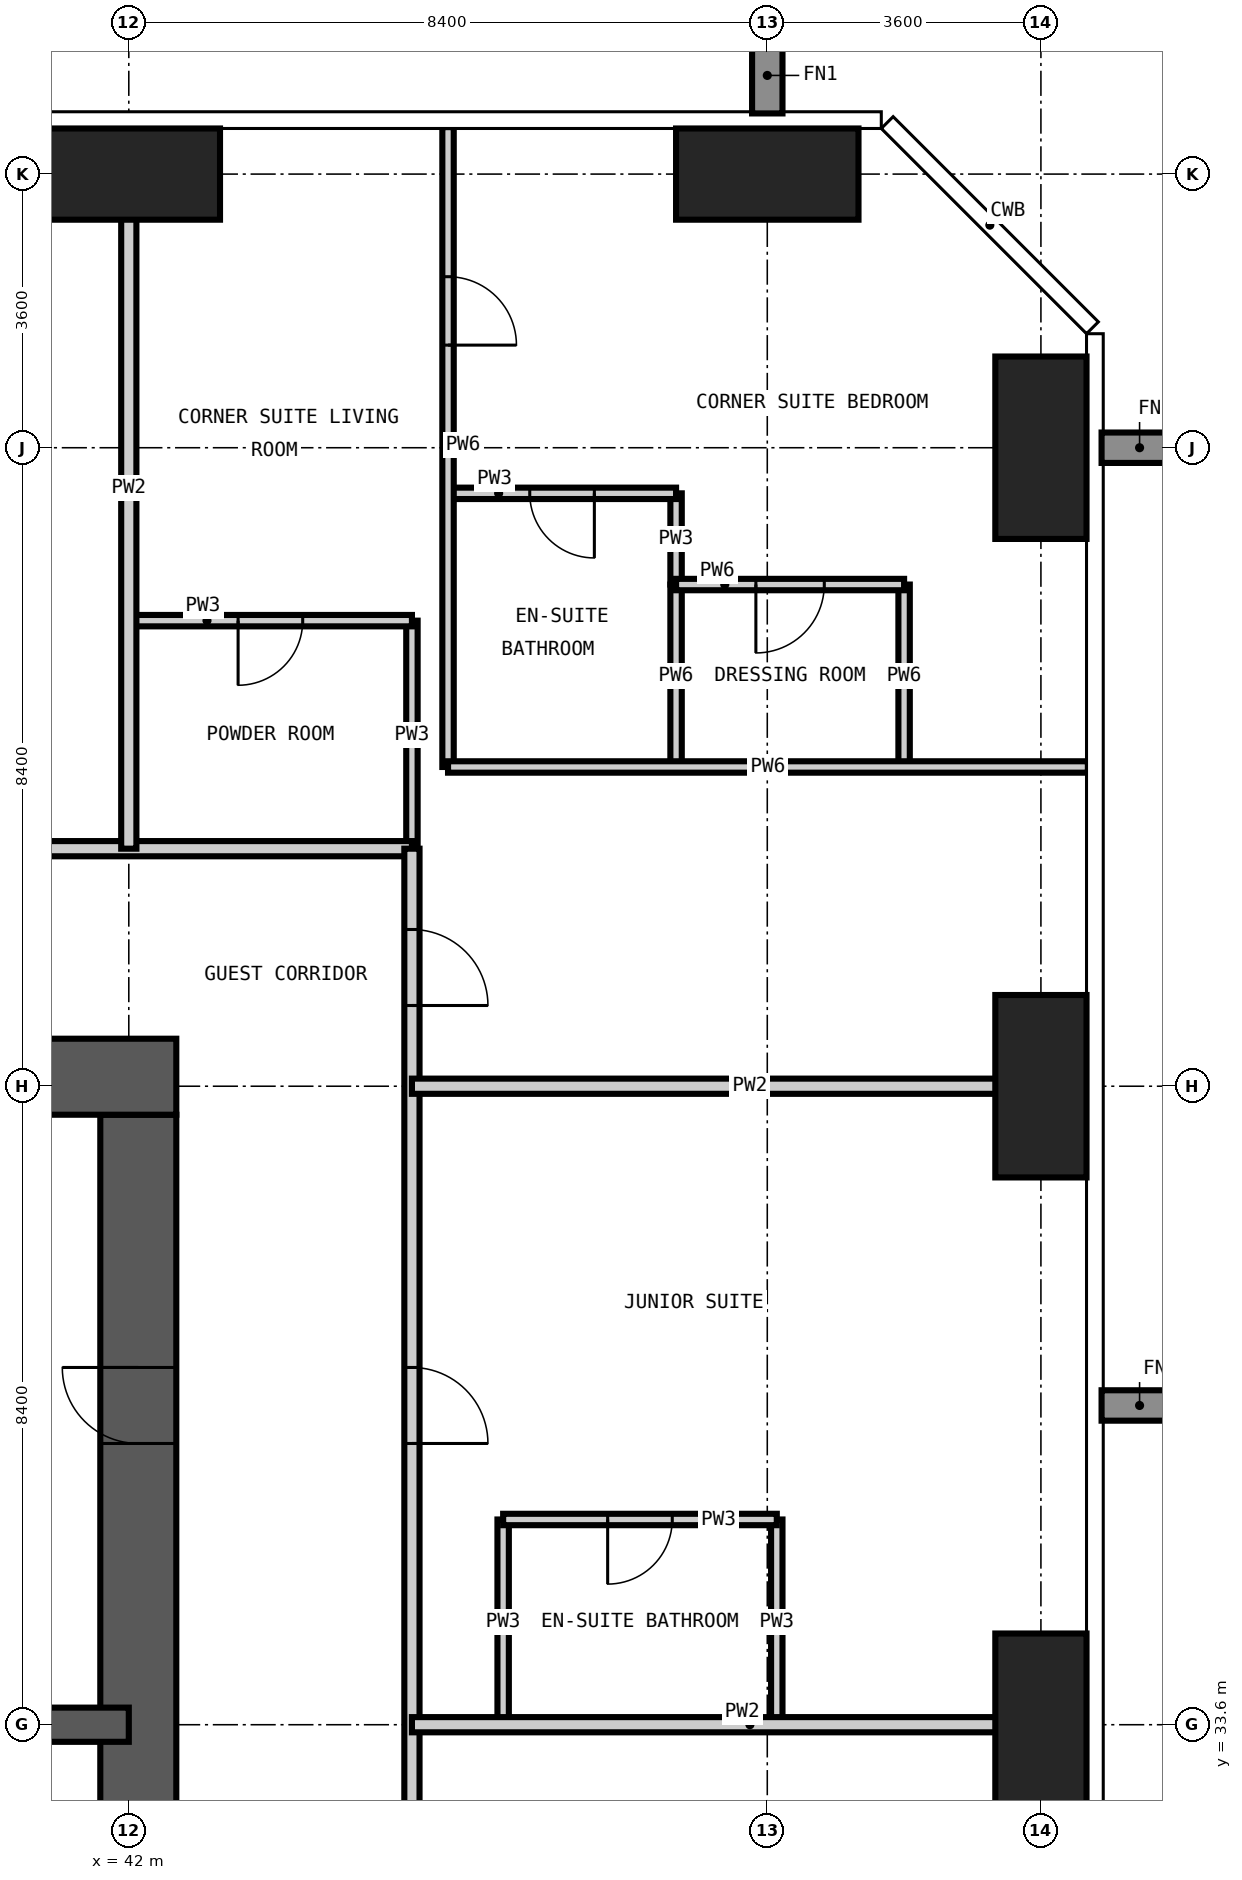
"""IFC4 building model, lengths in metres.
Left out: names, types, materials, properties, quantities, classifications, styles, units other than length and angle.
Written with IfcOpenShell. Run it as: python <this file> out.ifc"""

import sys

from ifc_helpers import new_model, si_unit, direction, frame, frame_2d, origin, origin_2d, place, context, subcontext, project, spatial, rectangle, extrude, element, fill, save


model = new_model("IFC4")
c1 = context("Model", 3, precision=1e-05, world=origin(), true_north=direction((0.0, 1.0)))
c2 = subcontext(c1, "Body", "Model", "MODEL_VIEW")
j1 = project(units=[si_unit("LENGTHUNIT", "METRE"), si_unit("PLANEANGLEUNIT", "RADIAN")], contexts=[c1])
p1 = place(None, origin())
s1 = spatial("IfcSite", under=j1, at=p1, CompositionType="ELEMENT")
p2 = place(p1, origin())
s2 = spatial("IfcBuilding", under=s1, at=p2, CompositionType="ELEMENT")
p3 = place(p2, frame((0.0, 0.0, 133.2)))
s3 = spatial("IfcBuildingStorey", under=s2, at=p3, CompositionType="ELEMENT", Elevation=133.2)
for number, where, z_axis, x_axis in (
    (1, (42.0, 54.0, -0.35), (0.0, 0.0, 1.0), (1.0, 0.0, 0.0)),
    (2, (50.4, 54.0, -0.35), (0.0, 0.0, 1.0), (1.0, 0.0, 0.0)),
):
    element("IfcColumn", number, at=place(p3, frame(where, z_axis=z_axis, x_axis=x_axis)), inside=s3, PredefinedType="COLUMN", context=c2, shape_type="SweptSolid", body=[
        extrude(rectangle(XDim=2.4, YDim=1.2, at=origin_2d()), origin(), (0.0, 0.0, 1.0), 3.6),
    ])
for number, where, z_axis, x_axis in (
    (3, (54.0, 33.6, -0.35), (0.0, 0.0, 1.0), (1.0, 0.0, 0.0)),
    (4, (54.0, 42.0, -0.35), (0.0, 0.0, 1.0), (1.0, 0.0, 0.0)),
    (5, (54.0, 50.4, -0.35), (0.0, 0.0, 1.0), (1.0, 0.0, 0.0)),
):
    element("IfcColumn", number, at=place(p3, frame(where, z_axis=z_axis, x_axis=x_axis)), inside=s3, PredefinedType="COLUMN", context=c2, shape_type="SweptSolid", body=[
        extrude(rectangle(XDim=1.2, YDim=2.4, at=origin_2d()), origin(), (0.0, 0.0, 1.0), 3.6),
    ])
p4 = place(p3, frame((42.125, 17.175, -0.35), z_axis=(0.0, 0.0, 1.0), x_axis=(0.0, 1.0, 0.0)))
e6 = element("IfcWall", 6, at=p4, inside=s3, PredefinedType="SHEAR", context=c2, shape_type="SweptSolid", body=[
    extrude(rectangle(XDim=24.45, YDim=1.0, at=frame_2d((12.225, 0.0))), origin(), (0.0, 0.0, 1.0), 3.6),
])
p5 = place(p4, frame((0.425, 0.0, 0.35)))
e7 = element("IfcOpeningElement", 7, at=p5, cuts=e6, PredefinedType="OPENING", context=c2, shape_type="SweptSolid", body=[
    extrude(rectangle(XDim=1.2, YDim=2.2, at=frame_2d((0.6, 1.1))), frame((0.0, 0.51, 0.0), z_axis=(0.0, -1.0, 0.0), x_axis=(1.0, 0.0, 0.0)), (0.0, 0.0, 1.0), 1.02),
])
p6 = place(p4, frame((11.325, 0.0, 0.35)))
e8 = element("IfcOpeningElement", 8, at=p6, cuts=e6, PredefinedType="OPENING", context=c2, shape_type="SweptSolid", body=[
    extrude(rectangle(XDim=1.8, YDim=2.2, at=frame_2d((0.9, 1.1))), frame((0.0, 0.51, 0.0), z_axis=(0.0, -1.0, 0.0), x_axis=(1.0, 0.0, 0.0)), (0.0, 0.0, 1.0), 1.02),
])
p7 = place(p4, frame((20.125, 0.0, 0.35)))
e9 = element("IfcOpeningElement", 9, at=p7, cuts=e6, PredefinedType="OPENING", context=c2, shape_type="SweptSolid", body=[
    extrude(rectangle(XDim=1.0, YDim=2.1, at=frame_2d((0.5, 1.05))), frame((0.0, 0.51, 0.0), z_axis=(0.0, -1.0, 0.0), x_axis=(1.0, 0.0, 0.0)), (0.0, 0.0, 1.0), 1.02),
])
p8 = place(p3, frame((42.625, 42.125, -0.35), z_axis=(0.0, 0.0, 1.0), x_axis=(-1.0, 0.0, 0.0)))
e10 = element("IfcWall", 10, at=p8, inside=s3, PredefinedType="SHEAR", context=c2, shape_type="SweptSolid", body=[
    extrude(rectangle(XDim=26.45, YDim=1.0, at=frame_2d((13.225, 0.0))), origin(), (0.0, 0.0, 1.0), 3.6),
])
p9 = place(p8, frame((21.125, 0.0, 0.35)))
e11 = element("IfcOpeningElement", 11, at=p9, cuts=e10, PredefinedType="OPENING", context=c2, shape_type="SweptSolid", body=[
    extrude(rectangle(XDim=1.0, YDim=2.1, at=frame_2d((0.5, 1.05))), frame((0.0, 0.51, 0.0), z_axis=(0.0, -1.0, 0.0), x_axis=(1.0, 0.0, 0.0)), (0.0, 0.0, 1.0), 1.02),
])
p10 = place(p8, frame((10.525, 0.0, 0.35)))
e12 = element("IfcOpeningElement", 12, at=p10, cuts=e10, PredefinedType="OPENING", context=c2, shape_type="SweptSolid", body=[
    extrude(rectangle(XDim=1.2, YDim=2.2, at=frame_2d((0.6, 1.1))), frame((0.0, 0.51, 0.0), z_axis=(0.0, -1.0, 0.0), x_axis=(1.0, 0.0, 0.0)), (0.0, 0.0, 1.0), 1.02),
])
p11 = place(p3, frame((16.8, 33.6, -0.35), z_axis=(0.0, 0.0, 1.0), x_axis=(1.0, 0.0, 0.0)))
e13 = element("IfcWall", 13, at=p11, inside=s3, PredefinedType="SHEAR", context=c2, shape_type="SweptSolid", body=[
    extrude(rectangle(XDim=25.2, YDim=0.45, at=frame_2d((12.6, 0.0))), origin(), (0.0, 0.0, 1.0), 3.6),
])
p12 = place(p11, frame((22.6, 0.0, 0.35)))
e14 = element("IfcOpeningElement", 14, at=p12, cuts=e13, PredefinedType="OPENING", context=c2, shape_type="SweptSolid", body=[
    extrude(rectangle(XDim=1.0, YDim=2.1, at=frame_2d((0.5, 1.05))), frame((0.0, 0.235, 0.0), z_axis=(0.0, -1.0, 0.0), x_axis=(1.0, 0.0, 0.0)), (0.0, 0.0, 1.0), 0.47),
])
p13 = place(p3, frame((45.725, 45.125, 0.0), z_axis=(0.0, 0.0, 1.0), x_axis=(0.0, 1.0, 0.0)))
e15 = element("IfcWall", 15, at=p13, inside=s3, PredefinedType="PARTITIONING", context=c2, shape_type="SweptSolid", body=[
    extrude(rectangle(XDim=3.0, YDim=0.15, at=frame_2d((1.5, 0.0))), origin(), (0.0, 0.0, 1.0), 3.25),
])
p14 = place(p3, frame((46.925, 33.6, 0.0), z_axis=(0.0, 0.0, 1.0), x_axis=(0.0, 1.0, 0.0)))
e16 = element("IfcWall", 16, at=p14, inside=s3, PredefinedType="PARTITIONING", context=c2, shape_type="SweptSolid", body=[
    extrude(rectangle(XDim=2.7, YDim=0.15, at=frame_2d((1.35, 0.0))), origin(), (0.0, 0.0, 1.0), 3.25),
])
p15 = place(p3, frame((49.2, 48.6, 0.0), z_axis=(0.0, 0.0, 1.0), x_axis=(0.0, 1.0, 0.0)))
e17 = element("IfcWall", 17, at=p15, inside=s3, PredefinedType="PARTITIONING", context=c2, shape_type="SweptSolid", body=[
    extrude(rectangle(XDim=1.2, YDim=0.15, at=frame_2d((0.6, 0.0))), origin(), (0.0, 0.0, 1.0), 3.25),
])
p16 = place(p3, frame((50.525, 33.6, 0.0), z_axis=(0.0, 0.0, 1.0), x_axis=(0.0, 1.0, 0.0)))
e18 = element("IfcWall", 18, at=p16, inside=s3, PredefinedType="PARTITIONING", context=c2, shape_type="SweptSolid", body=[
    extrude(rectangle(XDim=2.7, YDim=0.15, at=frame_2d((1.35, 0.0))), origin(), (0.0, 0.0, 1.0), 3.25),
])
p17 = place(p3, frame((46.925, 36.3, 0.0), z_axis=(0.0, 0.0, 1.0), x_axis=(1.0, 0.0, 0.0)))
e19 = element("IfcWall", 19, at=p17, inside=s3, PredefinedType="PARTITIONING", context=c2, shape_type="SweptSolid", body=[
    extrude(rectangle(XDim=3.6, YDim=0.15, at=frame_2d((1.8, 0.0))), origin(), (0.0, 0.0, 1.0), 3.25),
])
p18 = place(p17, frame((1.375, 0.0, 0.0)))
e20 = element("IfcOpeningElement", 20, at=p18, cuts=e19, PredefinedType="OPENING", context=c2, shape_type="SweptSolid", body=[
    extrude(rectangle(XDim=0.85, YDim=2.1, at=frame_2d((0.425, 1.05))), frame((0.0, 0.085, 0.0), z_axis=(0.0, -1.0, 0.0), x_axis=(1.0, 0.0, 0.0)), (0.0, 0.0, 1.0), 0.17),
])
p19 = place(p3, frame((42.0, 48.125, 0.0), z_axis=(0.0, 0.0, 1.0), x_axis=(1.0, 0.0, 0.0)))
e21 = element("IfcWall", 21, at=p19, inside=s3, PredefinedType="PARTITIONING", context=c2, shape_type="SweptSolid", body=[
    extrude(rectangle(XDim=3.725, YDim=0.15, at=frame_2d((1.863, 0.0))), origin(), (0.0, 0.0, 1.0), 3.25),
])
p20 = place(p19, frame((1.438, 0.0, 0.0)))
e22 = element("IfcOpeningElement", 22, at=p20, cuts=e21, PredefinedType="OPENING", context=c2, shape_type="SweptSolid", body=[
    extrude(rectangle(XDim=0.85, YDim=2.1, at=frame_2d((0.425, 1.05))), frame((0.0, 0.085, 0.0), z_axis=(0.0, -1.0, 0.0), x_axis=(1.0, 0.0, 0.0)), (0.0, 0.0, 1.0), 0.17),
])
p21 = place(p3, frame((46.2, 49.8, 0.0), z_axis=(0.0, 0.0, 1.0), x_axis=(1.0, 0.0, 0.0)))
e23 = element("IfcWall", 23, at=p21, inside=s3, PredefinedType="PARTITIONING", context=c2, shape_type="SweptSolid", body=[
    extrude(rectangle(XDim=3.0, YDim=0.15, at=frame_2d((1.5, 0.0))), origin(), (0.0, 0.0, 1.0), 3.25),
])
p22 = place(p21, frame((1.075, 0.0, 0.0)))
e24 = element("IfcOpeningElement", 24, at=p22, cuts=e23, PredefinedType="OPENING", context=c2, shape_type="SweptSolid", body=[
    extrude(rectangle(XDim=0.85, YDim=2.1, at=frame_2d((0.425, 1.05))), frame((0.0, 0.085, 0.0), z_axis=(0.0, -1.0, 0.0), x_axis=(1.0, 0.0, 0.0)), (0.0, 0.0, 1.0), 0.17),
])
p23 = place(p3, frame((12.6, 45.125, 0.0), z_axis=(0.0, 0.0, 1.0), x_axis=(1.0, 0.0, 0.0)))
e25 = element("IfcWall", 25, at=p23, inside=s3, PredefinedType="PARTITIONING", context=c2, shape_type="SweptSolid", body=[
    extrude(rectangle(XDim=33.125, YDim=0.2, at=frame_2d((16.562, 0.0))), origin(), (0.0, 0.0, 1.0), 3.25),
])
p24 = place(p23, frame((5.8, 0.0, 0.0)))
e26 = element("IfcOpeningElement", 26, at=p24, cuts=e25, PredefinedType="OPENING", context=c2, shape_type="SweptSolid", body=[
    extrude(rectangle(XDim=1.0, YDim=2.2, at=frame_2d((0.5, 1.1))), frame((0.0, 0.11, 0.0), z_axis=(0.0, -1.0, 0.0), x_axis=(1.0, 0.0, 0.0)), (0.0, 0.0, 1.0), 0.22),
])
p25 = place(p23, frame((12.1, 0.0, 0.0)))
e27 = element("IfcOpeningElement", 27, at=p25, cuts=e25, PredefinedType="OPENING", context=c2, shape_type="SweptSolid", body=[
    extrude(rectangle(XDim=1.0, YDim=2.2, at=frame_2d((0.5, 1.1))), frame((0.0, 0.11, 0.0), z_axis=(0.0, -1.0, 0.0), x_axis=(1.0, 0.0, 0.0)), (0.0, 0.0, 1.0), 0.22),
])
p26 = place(p23, frame((20.5, 0.0, 0.0)))
e28 = element("IfcOpeningElement", 28, at=p26, cuts=e25, PredefinedType="OPENING", context=c2, shape_type="SweptSolid", body=[
    extrude(rectangle(XDim=1.0, YDim=2.2, at=frame_2d((0.5, 1.1))), frame((0.0, 0.11, 0.0), z_axis=(0.0, -1.0, 0.0), x_axis=(1.0, 0.0, 0.0)), (0.0, 0.0, 1.0), 0.22),
])
p27 = place(p23, frame((26.8, 0.0, 0.0)))
e29 = element("IfcOpeningElement", 29, at=p27, cuts=e25, PredefinedType="OPENING", context=c2, shape_type="SweptSolid", body=[
    extrude(rectangle(XDim=1.0, YDim=2.2, at=frame_2d((0.5, 1.1))), frame((0.0, 0.11, 0.0), z_axis=(0.0, -1.0, 0.0), x_axis=(1.0, 0.0, 0.0)), (0.0, 0.0, 1.0), 0.22),
])
p28 = place(p3, frame((45.725, 45.125, 0.0), z_axis=(0.0, 0.0, 1.0), x_axis=(0.0, -1.0, 0.0)))
e30 = element("IfcWall", 30, at=p28, inside=s3, PredefinedType="PARTITIONING", context=c2, shape_type="SweptSolid", body=[
    extrude(rectangle(XDim=30.85, YDim=0.2, at=frame_2d((15.425, 0.0))), origin(), (0.0, 0.0, 1.0), 3.25),
])
p29 = place(p28, frame((21.525, 0.0, 0.0)))
e31 = element("IfcOpeningElement", 31, at=p29, cuts=e30, PredefinedType="OPENING", context=c2, shape_type="SweptSolid", body=[
    extrude(rectangle(XDim=1.0, YDim=2.2, at=frame_2d((0.5, 1.1))), frame((0.0, 0.11, 0.0), z_axis=(0.0, -1.0, 0.0), x_axis=(1.0, 0.0, 0.0)), (0.0, 0.0, 1.0), 0.22),
])
p30 = place(p28, frame((13.125, 0.0, 0.0)))
e32 = element("IfcOpeningElement", 32, at=p30, cuts=e30, PredefinedType="OPENING", context=c2, shape_type="SweptSolid", body=[
    extrude(rectangle(XDim=1.0, YDim=2.2, at=frame_2d((0.5, 1.1))), frame((0.0, 0.11, 0.0), z_axis=(0.0, -1.0, 0.0), x_axis=(1.0, 0.0, 0.0)), (0.0, 0.0, 1.0), 0.22),
])
p31 = place(p28, frame((6.825, 0.0, 0.0)))
e33 = element("IfcOpeningElement", 33, at=p31, cuts=e30, PredefinedType="OPENING", context=c2, shape_type="SweptSolid", body=[
    extrude(rectangle(XDim=1.0, YDim=2.2, at=frame_2d((0.5, 1.1))), frame((0.0, 0.11, 0.0), z_axis=(0.0, -1.0, 0.0), x_axis=(1.0, 0.0, 0.0)), (0.0, 0.0, 1.0), 0.22),
])
p32 = place(p28, frame((29.087, 0.0, 0.0)))
e34 = element("IfcOpeningElement", 34, at=p32, cuts=e30, PredefinedType="OPENING", context=c2, shape_type="SweptSolid", body=[
    extrude(rectangle(XDim=1.0, YDim=2.2, at=frame_2d((0.5, 1.1))), frame((0.0, 0.11, 0.0), z_axis=(0.0, -1.0, 0.0), x_axis=(1.0, 0.0, 0.0)), (0.0, 0.0, 1.0), 0.22),
])
p33 = place(p28, frame((1.063, 0.0, 0.0)))
e35 = element("IfcOpeningElement", 35, at=p33, cuts=e30, PredefinedType="OPENING", context=c2, shape_type="SweptSolid", body=[
    extrude(rectangle(XDim=1.0, YDim=2.2, at=frame_2d((0.5, 1.1))), frame((0.0, 0.11, 0.0), z_axis=(0.0, -1.0, 0.0), x_axis=(1.0, 0.0, 0.0)), (0.0, 0.0, 1.0), 0.22),
])
p34 = place(p3, frame((42.0, 45.125, 0.0), z_axis=(0.0, 0.0, 1.0), x_axis=(0.0, 1.0, 0.0)))
e36 = element("IfcWall", 36, at=p34, inside=s3, PredefinedType="PARTITIONING", context=c2, shape_type="SweptSolid", body=[
    extrude(rectangle(XDim=9.493, YDim=0.2, at=frame_2d((4.747, 0.0))), origin(), (0.0, 0.0, 1.0), 3.25),
])
for number, where, z_axis, x_axis in (
    (37, (45.725, 33.6, 0.0), (0.0, 0.0, 1.0), (1.0, 0.0, 0.0)),
    (38, (45.725, 42.0, 0.0), (0.0, 0.0, 1.0), (1.0, 0.0, 0.0)),
):
    element("IfcWall", number, at=place(p3, frame(where, z_axis=z_axis, x_axis=x_axis)), inside=s3, PredefinedType="PARTITIONING", context=c2, shape_type="SweptSolid", body=[
        extrude(rectangle(XDim=8.893, YDim=0.2, at=frame_2d((4.446, 0.0))), origin(), (0.0, 0.0, 1.0), 3.25),
    ])
p35 = place(p3, frame((46.2, 46.2, 0.0), z_axis=(0.0, 0.0, 1.0), x_axis=(0.0, 1.0, 0.0)))
e39 = element("IfcWall", 39, at=p35, inside=s3, PredefinedType="PARTITIONING", context=c2, shape_type="SweptSolid", body=[
    extrude(rectangle(XDim=8.418, YDim=0.15, at=frame_2d((4.209, 0.0))), origin(), (0.0, 0.0, 1.0), 3.25),
])
p36 = place(p35, frame((5.55, 0.0, 0.0)))
e40 = element("IfcOpeningElement", 40, at=p36, cuts=e39, PredefinedType="OPENING", context=c2, shape_type="SweptSolid", body=[
    extrude(rectangle(XDim=0.9, YDim=2.1, at=frame_2d((0.45, 1.05))), frame((0.0, 0.085, 0.0), z_axis=(0.0, -1.0, 0.0), x_axis=(1.0, 0.0, 0.0)), (0.0, 0.0, 1.0), 0.17),
])
for number, where, z_axis, x_axis in (
    (41, (49.2, 46.2, 0.0), (0.0, 0.0, 1.0), (0.0, 1.0, 0.0)),
    (42, (52.2, 46.2, 0.0), (0.0, 0.0, 1.0), (0.0, 1.0, 0.0)),
):
    element("IfcWall", number, at=place(p3, frame(where, z_axis=z_axis, x_axis=x_axis)), inside=s3, PredefinedType="PARTITIONING", context=c2, shape_type="SweptSolid", body=[
        extrude(rectangle(XDim=2.4, YDim=0.15, at=frame_2d((1.2, 0.0))), origin(), (0.0, 0.0, 1.0), 3.25),
    ])
p37 = place(p3, frame((46.2, 46.2, 0.0), z_axis=(0.0, 0.0, 1.0), x_axis=(1.0, 0.0, 0.0)))
e43 = element("IfcWall", 43, at=p37, inside=s3, PredefinedType="PARTITIONING", context=c2, shape_type="SweptSolid", body=[
    extrude(rectangle(XDim=8.418, YDim=0.15, at=frame_2d((4.209, 0.0))), origin(), (0.0, 0.0, 1.0), 3.25),
])
p38 = place(p3, frame((49.2, 48.6, 0.0), z_axis=(0.0, 0.0, 1.0), x_axis=(1.0, 0.0, 0.0)))
e44 = element("IfcWall", 44, at=p38, inside=s3, PredefinedType="PARTITIONING", context=c2, shape_type="SweptSolid", body=[
    extrude(rectangle(XDim=3.0, YDim=0.15, at=frame_2d((1.5, 0.0))), origin(), (0.0, 0.0, 1.0), 3.25),
])
p39 = place(p38, frame((1.05, 0.0, 0.0)))
e45 = element("IfcOpeningElement", 45, at=p39, cuts=e44, PredefinedType="OPENING", context=c2, shape_type="SweptSolid", body=[
    extrude(rectangle(XDim=0.9, YDim=2.1, at=frame_2d((0.45, 1.05))), frame((0.0, 0.085, 0.0), z_axis=(0.0, -1.0, 0.0), x_axis=(1.0, 0.0, 0.0)), (0.0, 0.0, 1.0), 0.17),
])
p40 = place(p31, origin())
e46 = element("IfcDoor", 46, at=p40, inside=s3, OperationType="SINGLE_SWING_RIGHT", PredefinedType="DOOR", context=c2, shape_type="SweptSolid", body=[
    extrude(rectangle(XDim=1.0, YDim=2.2, at=frame_2d((0.5, 1.1))), frame((0.0, 0.025, 0.0), z_axis=(0.0, -1.0, 0.0), x_axis=(1.0, 0.0, 0.0)), (0.0, 0.0, 1.0), 0.05),
])
fill(e33, e46)
p41 = place(p18, frame((0.85, 0.0, 0.0), z_axis=(0.0, 0.0, 1.0), x_axis=(-1.0, 0.0, 0.0)))
e47 = element("IfcDoor", 47, at=p41, inside=s3, OperationType="SINGLE_SWING_RIGHT", PredefinedType="DOOR", context=c2, shape_type="SweptSolid", body=[
    extrude(rectangle(XDim=0.85, YDim=2.1, at=frame_2d((0.425, 1.05))), frame((0.0, 0.025, 0.0), z_axis=(0.0, -1.0, 0.0), x_axis=(1.0, 0.0, 0.0)), (0.0, 0.0, 1.0), 0.05),
])
fill(e20, e47)
p42 = place(p33, origin())
e48 = element("IfcDoor", 48, at=p42, inside=s3, OperationType="SINGLE_SWING_RIGHT", PredefinedType="DOOR", context=c2, shape_type="SweptSolid", body=[
    extrude(rectangle(XDim=1.0, YDim=2.2, at=frame_2d((0.5, 1.1))), frame((0.0, 0.025, 0.0), z_axis=(0.0, -1.0, 0.0), x_axis=(1.0, 0.0, 0.0)), (0.0, 0.0, 1.0), 0.05),
])
fill(e35, e48)
p43 = place(p20, frame((0.85, 0.0, 0.0), z_axis=(0.0, 0.0, 1.0), x_axis=(-1.0, 0.0, 0.0)))
e49 = element("IfcDoor", 49, at=p43, inside=s3, OperationType="SINGLE_SWING_RIGHT", PredefinedType="DOOR", context=c2, shape_type="SweptSolid", body=[
    extrude(rectangle(XDim=0.85, YDim=2.1, at=frame_2d((0.425, 1.05))), frame((0.0, 0.025, 0.0), z_axis=(0.0, -1.0, 0.0), x_axis=(1.0, 0.0, 0.0)), (0.0, 0.0, 1.0), 0.05),
])
fill(e22, e49)
p44 = place(p36, frame((0.9, 0.0, 0.0), z_axis=(0.0, 0.0, 1.0), x_axis=(-1.0, 0.0, 0.0)))
e50 = element("IfcDoor", 50, at=p44, inside=s3, OperationType="SINGLE_SWING_RIGHT", PredefinedType="DOOR", context=c2, shape_type="SweptSolid", body=[
    extrude(rectangle(XDim=0.9, YDim=2.1, at=frame_2d((0.45, 1.05))), frame((0.0, 0.025, 0.0), z_axis=(0.0, -1.0, 0.0), x_axis=(1.0, 0.0, 0.0)), (0.0, 0.0, 1.0), 0.05),
])
fill(e40, e50)
p45 = place(p22, frame((0.85, 0.0, 0.0), z_axis=(0.0, 0.0, 1.0), x_axis=(-1.0, 0.0, 0.0)))
e51 = element("IfcDoor", 51, at=p45, inside=s3, OperationType="SINGLE_SWING_LEFT", PredefinedType="DOOR", context=c2, shape_type="SweptSolid", body=[
    extrude(rectangle(XDim=0.85, YDim=2.1, at=frame_2d((0.425, 1.05))), frame((0.0, 0.025, 0.0), z_axis=(0.0, -1.0, 0.0), x_axis=(1.0, 0.0, 0.0)), (0.0, 0.0, 1.0), 0.05),
])
fill(e24, e51)
p46 = place(p39, frame((0.9, 0.0, 0.0), z_axis=(0.0, 0.0, 1.0), x_axis=(-1.0, 0.0, 0.0)))
e52 = element("IfcDoor", 52, at=p46, inside=s3, OperationType="SINGLE_SWING_RIGHT", PredefinedType="DOOR", context=c2, shape_type="SweptSolid", body=[
    extrude(rectangle(XDim=0.9, YDim=2.1, at=frame_2d((0.45, 1.05))), frame((0.0, 0.025, 0.0), z_axis=(0.0, -1.0, 0.0), x_axis=(1.0, 0.0, 0.0)), (0.0, 0.0, 1.0), 0.05),
])
fill(e45, e52)
p47 = place(p7, origin())
e53 = element("IfcDoor", 53, at=p47, inside=s3, OperationType="SINGLE_SWING_RIGHT", PredefinedType="DOOR", context=c2, shape_type="SweptSolid", body=[
    extrude(rectangle(XDim=1.0, YDim=2.1, at=frame_2d((0.5, 1.05))), frame((0.0, 0.025, 0.0), z_axis=(0.0, -1.0, 0.0), x_axis=(1.0, 0.0, 0.0)), (0.0, 0.0, 1.0), 0.05),
])
fill(e9, e53)
save(model, sys.argv[1])
